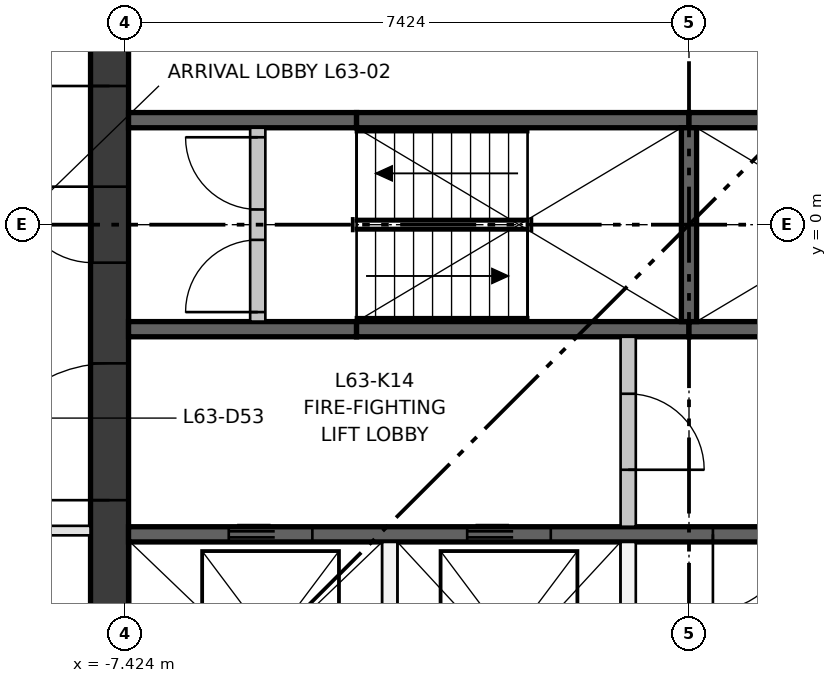
"""IFC4 building model, lengths in metres.
Left out: names, types, materials, properties, quantities, classifications, styles, units other than length and angle.
Written with IfcOpenShell. Run it as: python <this file> out.ifc"""

import sys

from ifc_helpers import new_model, si_unit, direction, frame, frame_2d, origin, place, context, subcontext, project, spatial, rectangle, extrude, element, fill, save


model = new_model("IFC4")
c1 = context("Model", 3, precision=1e-05, world=origin(), true_north=direction((0.0, 1.0)))
c2 = subcontext(c1, "Body", "Model", "MODEL_VIEW")
j1 = project(units=[si_unit("LENGTHUNIT", "METRE"), si_unit("PLANEANGLEUNIT", "RADIAN")], contexts=[c1])
p1 = place(None, origin())
s1 = spatial("IfcSite", under=j1, at=p1, CompositionType="ELEMENT")
p2 = place(p1, origin())
s2 = spatial("IfcBuilding", under=s1, at=p2, CompositionType="ELEMENT")
p3 = place(p2, frame((0.0, 0.0, 231.2)))
s3 = spatial("IfcBuildingStorey", under=s2, at=p3, CompositionType="ELEMENT", Elevation=231.2)
p4 = place(p3, frame((-7.624, -7.374, 0.0), z_axis=(0.0, 0.0, 1.0), x_axis=(0.0, 1.0, 0.0)))
e1 = element("IfcWall", 1, at=p4, inside=s3, PredefinedType="SHEAR", context=c2, shape_type="SweptSolid", body=[
    extrude(rectangle(XDim=14.748, YDim=0.5, at=frame_2d((7.374, 0.0))), origin(), (0.0, 0.0, 1.0), 3.3),
])
p5 = place(p4, frame((6.874, 0.0, 0.0)))
e2 = element("IfcOpeningElement", 2, at=p5, cuts=e1, PredefinedType="OPENING", context=c2, shape_type="SweptSolid", body=[
    extrude(rectangle(XDim=1.0, YDim=2.1, at=frame_2d((0.5, 1.05))), frame((0.0, 0.26, 0.0), z_axis=(0.0, -1.0, 0.0), x_axis=(1.0, 0.0, 0.0)), (0.0, 0.0, 1.0), 0.52),
])
p6 = place(p4, frame((3.75, 0.0, 0.0)))
e3 = element("IfcOpeningElement", 3, at=p6, cuts=e1, PredefinedType="OPENING", context=c2, shape_type="SweptSolid", body=[
    extrude(rectangle(XDim=1.8, YDim=2.1, at=frame_2d((0.9, 1.05))), frame((0.0, 0.26, 0.0), z_axis=(0.0, -1.0, 0.0), x_axis=(1.0, 0.0, 0.0)), (0.0, 0.0, 1.0), 0.52),
])
p7 = place(p4, frame((9.198, 0.0, 0.0)))
e4 = element("IfcOpeningElement", 4, at=p7, cuts=e1, PredefinedType="OPENING", context=c2, shape_type="SweptSolid", body=[
    extrude(rectangle(XDim=1.8, YDim=2.1, at=frame_2d((0.9, 1.05))), frame((0.0, 0.26, 0.0), z_axis=(0.0, -1.0, 0.0), x_axis=(1.0, 0.0, 0.0)), (0.0, 0.0, 1.0), 0.52),
])
p8 = place(p3, frame((-7.374, -4.074, 0.0), z_axis=(0.0, 0.0, 1.0), x_axis=(1.0, 0.0, 0.0)))
e5 = element("IfcWall", 5, at=p8, inside=s3, PredefinedType="SHEAR", context=c2, shape_type="SweptSolid", body=[
    extrude(rectangle(XDim=14.748, YDim=0.2, at=frame_2d((7.374, 0.0))), origin(), (0.0, 0.0, 1.0), 3.3),
])
p9 = place(p8, frame((1.319, 0.0, 0.0)))
e6 = element("IfcOpeningElement", 6, at=p9, cuts=e5, PredefinedType="OPENING", context=c2, shape_type="SweptSolid", body=[
    extrude(rectangle(XDim=1.1, YDim=2.1, at=frame_2d((0.55, 1.05))), frame((0.0, 0.11, 0.0), z_axis=(0.0, -1.0, 0.0), x_axis=(1.0, 0.0, 0.0)), (0.0, 0.0, 1.0), 0.22),
])
p10 = place(p8, frame((4.456, 0.0, 0.0)))
e7 = element("IfcOpeningElement", 7, at=p10, cuts=e5, PredefinedType="OPENING", context=c2, shape_type="SweptSolid", body=[
    extrude(rectangle(XDim=1.1, YDim=2.1, at=frame_2d((0.55, 1.05))), frame((0.0, 0.11, 0.0), z_axis=(0.0, -1.0, 0.0), x_axis=(1.0, 0.0, 0.0)), (0.0, 0.0, 1.0), 0.22),
])
p11 = place(p8, frame((7.689, 0.0, 0.0)))
e8 = element("IfcOpeningElement", 8, at=p11, cuts=e5, PredefinedType="OPENING", context=c2, shape_type="SweptSolid", body=[
    extrude(rectangle(XDim=1.0, YDim=2.1, at=frame_2d((0.5, 1.05))), frame((0.0, 0.11, 0.0), z_axis=(0.0, -1.0, 0.0), x_axis=(1.0, 0.0, 0.0)), (0.0, 0.0, 1.0), 0.22),
])
p12 = place(p8, frame((10.413, 0.0, 0.0)))
e9 = element("IfcOpeningElement", 9, at=p12, cuts=e5, PredefinedType="OPENING", context=c2, shape_type="SweptSolid", body=[
    extrude(rectangle(XDim=1.0, YDim=2.1, at=frame_2d((0.5, 1.05))), frame((0.0, 0.11, 0.0), z_axis=(0.0, -1.0, 0.0), x_axis=(1.0, 0.0, 0.0)), (0.0, 0.0, 1.0), 0.22),
])
p13 = place(p8, frame((12.935, 0.0, 0.0)))
e10 = element("IfcOpeningElement", 10, at=p13, cuts=e5, PredefinedType="OPENING", context=c2, shape_type="SweptSolid", body=[
    extrude(rectangle(XDim=1.0, YDim=2.1, at=frame_2d((0.5, 1.05))), frame((0.0, 0.11, 0.0), z_axis=(0.0, -1.0, 0.0), x_axis=(1.0, 0.0, 0.0)), (0.0, 0.0, 1.0), 0.22),
])
p14 = place(p3, frame((-7.374, -1.375, 0.0), z_axis=(0.0, 0.0, 1.0), x_axis=(1.0, 0.0, 0.0)))
e11 = element("IfcWall", 11, at=p14, inside=s3, PredefinedType="SHEAR", context=c2, shape_type="SweptSolid", body=[
    extrude(rectangle(XDim=3.0, YDim=0.2, at=frame_2d((1.5, 0.0))), origin(), (0.0, 0.0, 1.0), 3.3),
])
for number, where, z_axis, x_axis in (
    (12, (-4.374, -1.375, 0.0), (0.0, 0.0, 1.0), (1.0, 0.0, 0.0)),
    (13, (0.0, -1.375, 0.0), (0.0, 0.0, 1.0), (1.0, 0.0, 0.0)),
):
    element("IfcWall", number, at=place(p3, frame(where, z_axis=z_axis, x_axis=x_axis)), inside=s3, PredefinedType="SHEAR", context=c2, shape_type="SweptSolid", body=[
        extrude(rectangle(XDim=4.374, YDim=0.2, at=frame_2d((2.187, 0.0))), origin(), (0.0, 0.0, 1.0), 3.3),
    ])
p15 = place(p3, frame((-7.374, 1.375, 0.0), z_axis=(0.0, 0.0, 1.0), x_axis=(1.0, 0.0, 0.0)))
e14 = element("IfcWall", 14, at=p15, inside=s3, PredefinedType="SHEAR", context=c2, shape_type="SweptSolid", body=[
    extrude(rectangle(XDim=3.0, YDim=0.2, at=frame_2d((1.5, 0.0))), origin(), (0.0, 0.0, 1.0), 3.3),
])
for number, where, z_axis, x_axis in (
    (15, (-4.374, 1.375, 0.0), (0.0, 0.0, 1.0), (1.0, 0.0, 0.0)),
    (16, (0.0, 1.375, 0.0), (0.0, 0.0, 1.0), (1.0, 0.0, 0.0)),
):
    element("IfcWall", number, at=place(p3, frame(where, z_axis=z_axis, x_axis=x_axis)), inside=s3, PredefinedType="SHEAR", context=c2, shape_type="SweptSolid", body=[
        extrude(rectangle(XDim=4.374, YDim=0.2, at=frame_2d((2.187, 0.0))), origin(), (0.0, 0.0, 1.0), 3.3),
    ])
p16 = place(p3, frame((0.0, -1.275, 0.0), z_axis=(0.0, 0.0, 1.0), x_axis=(0.0, 1.0, 0.0)))
e17 = element("IfcWall", 17, at=p16, inside=s3, PredefinedType="SHEAR", context=c2, shape_type="SweptSolid", body=[
    extrude(rectangle(XDim=2.55, YDim=0.2, at=frame_2d((1.275, 0.0))), origin(), (0.0, 0.0, 1.0), 3.3),
])
for number, where, z_axis, x_axis in (
    (18, (-3.937, -7.374, 0.0), (0.0, 0.0, 1.0), (0.0, 1.0, 0.0)),
    (19, (-0.8, -7.374, 0.0), (0.0, 0.0, 1.0), (0.0, 1.0, 0.0)),
):
    element("IfcWall", number, at=place(p3, frame(where, z_axis=z_axis, x_axis=x_axis)), inside=s3, PredefinedType="PARTITIONING", context=c2, shape_type="SweptSolid", body=[
        extrude(rectangle(XDim=3.2, YDim=0.2, at=frame_2d((1.6, 0.0))), origin(), (0.0, 0.0, 1.0), 3.3),
    ])
p17 = place(p3, frame((-0.8, -3.974, 0.0), z_axis=(0.0, 0.0, 1.0), x_axis=(0.0, 1.0, 0.0)))
e20 = element("IfcWall", 20, at=p17, inside=s3, PredefinedType="PARTITIONING", context=c2, shape_type="SweptSolid", body=[
    extrude(rectangle(XDim=2.499, YDim=0.2, at=frame_2d((1.25, 0.0))), origin(), (0.0, 0.0, 1.0), 3.3),
])
p18 = place(p17, frame((0.75, 0.0, 0.0)))
e21 = element("IfcOpeningElement", 21, at=p18, cuts=e20, PredefinedType="OPENING", context=c2, shape_type="SweptSolid", body=[
    extrude(rectangle(XDim=1.0, YDim=2.1, at=frame_2d((0.5, 1.05))), frame((0.0, 0.11, 0.0), z_axis=(0.0, -1.0, 0.0), x_axis=(1.0, 0.0, 0.0)), (0.0, 0.0, 1.0), 0.22),
])
p19 = place(p3, frame((-5.674, -1.275, 0.0), z_axis=(0.0, 0.0, 1.0), x_axis=(0.0, 1.0, 0.0)))
e22 = element("IfcWall", 22, at=p19, inside=s3, PredefinedType="PARTITIONING", context=c2, shape_type="SweptSolid", body=[
    extrude(rectangle(XDim=2.55, YDim=0.2, at=frame_2d((1.275, 0.0))), origin(), (0.0, 0.0, 1.0), 3.3),
])
p20 = place(p19, frame((0.125, 0.0, 0.0)))
e23 = element("IfcOpeningElement", 23, at=p20, cuts=e22, PredefinedType="OPENING", context=c2, shape_type="SweptSolid", body=[
    extrude(rectangle(XDim=0.95, YDim=2.1, at=frame_2d((0.475, 1.05))), frame((0.0, 0.11, 0.0), z_axis=(0.0, -1.0, 0.0), x_axis=(1.0, 0.0, 0.0)), (0.0, 0.0, 1.0), 0.22),
])
p21 = place(p19, frame((1.475, 0.0, 0.0)))
e24 = element("IfcOpeningElement", 24, at=p21, cuts=e22, PredefinedType="OPENING", context=c2, shape_type="SweptSolid", body=[
    extrude(rectangle(XDim=0.95, YDim=2.1, at=frame_2d((0.475, 1.05))), frame((0.0, 0.11, 0.0), z_axis=(0.0, -1.0, 0.0), x_axis=(1.0, 0.0, 0.0)), (0.0, 0.0, 1.0), 0.22),
])
p22 = place(p3, frame((-7.874, -4.024, 0.0), z_axis=(0.0, 0.0, 1.0), x_axis=(-1.0, 0.0, 0.0)))
e25 = element("IfcWall", 25, at=p22, inside=s3, PredefinedType="PARTITIONING", context=c2, shape_type="SweptSolid", body=[
    extrude(rectangle(XDim=1.109, YDim=0.125, at=frame_2d((0.554, 0.0))), origin(), (0.0, 0.0, 1.0), 3.3),
])
p23 = place(p9, origin())
e26 = element("IfcDoor", 26, at=p23, inside=s3, OperationType="DOUBLE_DOOR_SLIDING", PredefinedType="DOOR", context=c2, shape_type="SweptSolid", body=[
    extrude(rectangle(XDim=1.1, YDim=2.1, at=frame_2d((0.55, 1.05))), frame((0.0, 0.025, 0.0), z_axis=(0.0, -1.0, 0.0), x_axis=(1.0, 0.0, 0.0)), (0.0, 0.0, 1.0), 0.05),
])
fill(e6, e26)
p24 = place(p10, origin())
e27 = element("IfcDoor", 27, at=p24, inside=s3, OperationType="DOUBLE_DOOR_SLIDING", PredefinedType="DOOR", context=c2, shape_type="SweptSolid", body=[
    extrude(rectangle(XDim=1.1, YDim=2.1, at=frame_2d((0.55, 1.05))), frame((0.0, 0.025, 0.0), z_axis=(0.0, -1.0, 0.0), x_axis=(1.0, 0.0, 0.0)), (0.0, 0.0, 1.0), 0.05),
])
fill(e7, e27)
p25 = place(p20, origin())
e28 = element("IfcDoor", 28, at=p25, inside=s3, OperationType="SINGLE_SWING_LEFT", PredefinedType="DOOR", context=c2, shape_type="SweptSolid", body=[
    extrude(rectangle(XDim=0.95, YDim=2.1, at=frame_2d((0.475, 1.05))), frame((0.0, 0.025, 0.0), z_axis=(0.0, -1.0, 0.0), x_axis=(1.0, 0.0, 0.0)), (0.0, 0.0, 1.0), 0.05),
])
fill(e23, e28)
p26 = place(p21, origin())
e29 = element("IfcDoor", 29, at=p26, inside=s3, OperationType="SINGLE_SWING_RIGHT", PredefinedType="DOOR", context=c2, shape_type="SweptSolid", body=[
    extrude(rectangle(XDim=0.95, YDim=2.1, at=frame_2d((0.475, 1.05))), frame((0.0, 0.025, 0.0), z_axis=(0.0, -1.0, 0.0), x_axis=(1.0, 0.0, 0.0)), (0.0, 0.0, 1.0), 0.05),
])
fill(e24, e29)
p27 = place(p18, frame((1.0, 0.0, 0.0), z_axis=(0.0, 0.0, 1.0), x_axis=(-1.0, 0.0, 0.0)))
e30 = element("IfcDoor", 30, at=p27, inside=s3, OperationType="SINGLE_SWING_LEFT", PredefinedType="DOOR", context=c2, shape_type="SweptSolid", body=[
    extrude(rectangle(XDim=1.0, YDim=2.1, at=frame_2d((0.5, 1.05))), frame((0.0, 0.025, 0.0), z_axis=(0.0, -1.0, 0.0), x_axis=(1.0, 0.0, 0.0)), (0.0, 0.0, 1.0), 0.05),
])
fill(e21, e30)
p28 = place(p11, frame((1.0, 0.0, 0.0), z_axis=(0.0, 0.0, 1.0), x_axis=(-1.0, 0.0, 0.0)))
e31 = element("IfcDoor", 31, at=p28, inside=s3, OperationType="SINGLE_SWING_LEFT", PredefinedType="DOOR", context=c2, shape_type="SweptSolid", body=[
    extrude(rectangle(XDim=1.0, YDim=2.1, at=frame_2d((0.5, 1.05))), frame((0.0, 0.025, 0.0), z_axis=(0.0, -1.0, 0.0), x_axis=(1.0, 0.0, 0.0)), (0.0, 0.0, 1.0), 0.05),
])
fill(e8, e31)
p29 = place(p5, origin())
e32 = element("IfcDoor", 32, at=p29, inside=s3, OperationType="SINGLE_SWING_RIGHT", PredefinedType="DOOR", context=c2, shape_type="SweptSolid", body=[
    extrude(rectangle(XDim=1.0, YDim=2.1, at=frame_2d((0.5, 1.05))), frame((0.0, 0.25, 0.0), z_axis=(0.0, -1.0, 0.0), x_axis=(1.0, 0.0, 0.0)), (0.0, 0.0, 1.0), 0.05),
])
fill(e2, e32)
p30 = place(p6, origin())
e33 = element("IfcDoor", 33, at=p30, inside=s3, OperationType="DOUBLE_DOOR_SINGLE_SWING", PredefinedType="DOOR", context=c2, shape_type="SweptSolid", body=[
    extrude(rectangle(XDim=1.8, YDim=2.1, at=frame_2d((0.9, 1.05))), frame((0.0, 0.025, 0.0), z_axis=(0.0, -1.0, 0.0), x_axis=(1.0, 0.0, 0.0)), (0.0, 0.0, 1.0), 0.05),
])
fill(e3, e33)
p31 = place(p7, origin())
e34 = element("IfcDoor", 34, at=p31, inside=s3, OperationType="DOUBLE_DOOR_SINGLE_SWING", PredefinedType="DOOR", context=c2, shape_type="SweptSolid", body=[
    extrude(rectangle(XDim=1.8, YDim=2.1, at=frame_2d((0.9, 1.05))), frame((0.0, 0.025, 0.0), z_axis=(0.0, -1.0, 0.0), x_axis=(1.0, 0.0, 0.0)), (0.0, 0.0, 1.0), 0.05),
])
fill(e4, e34)
save(model, sys.argv[1])
